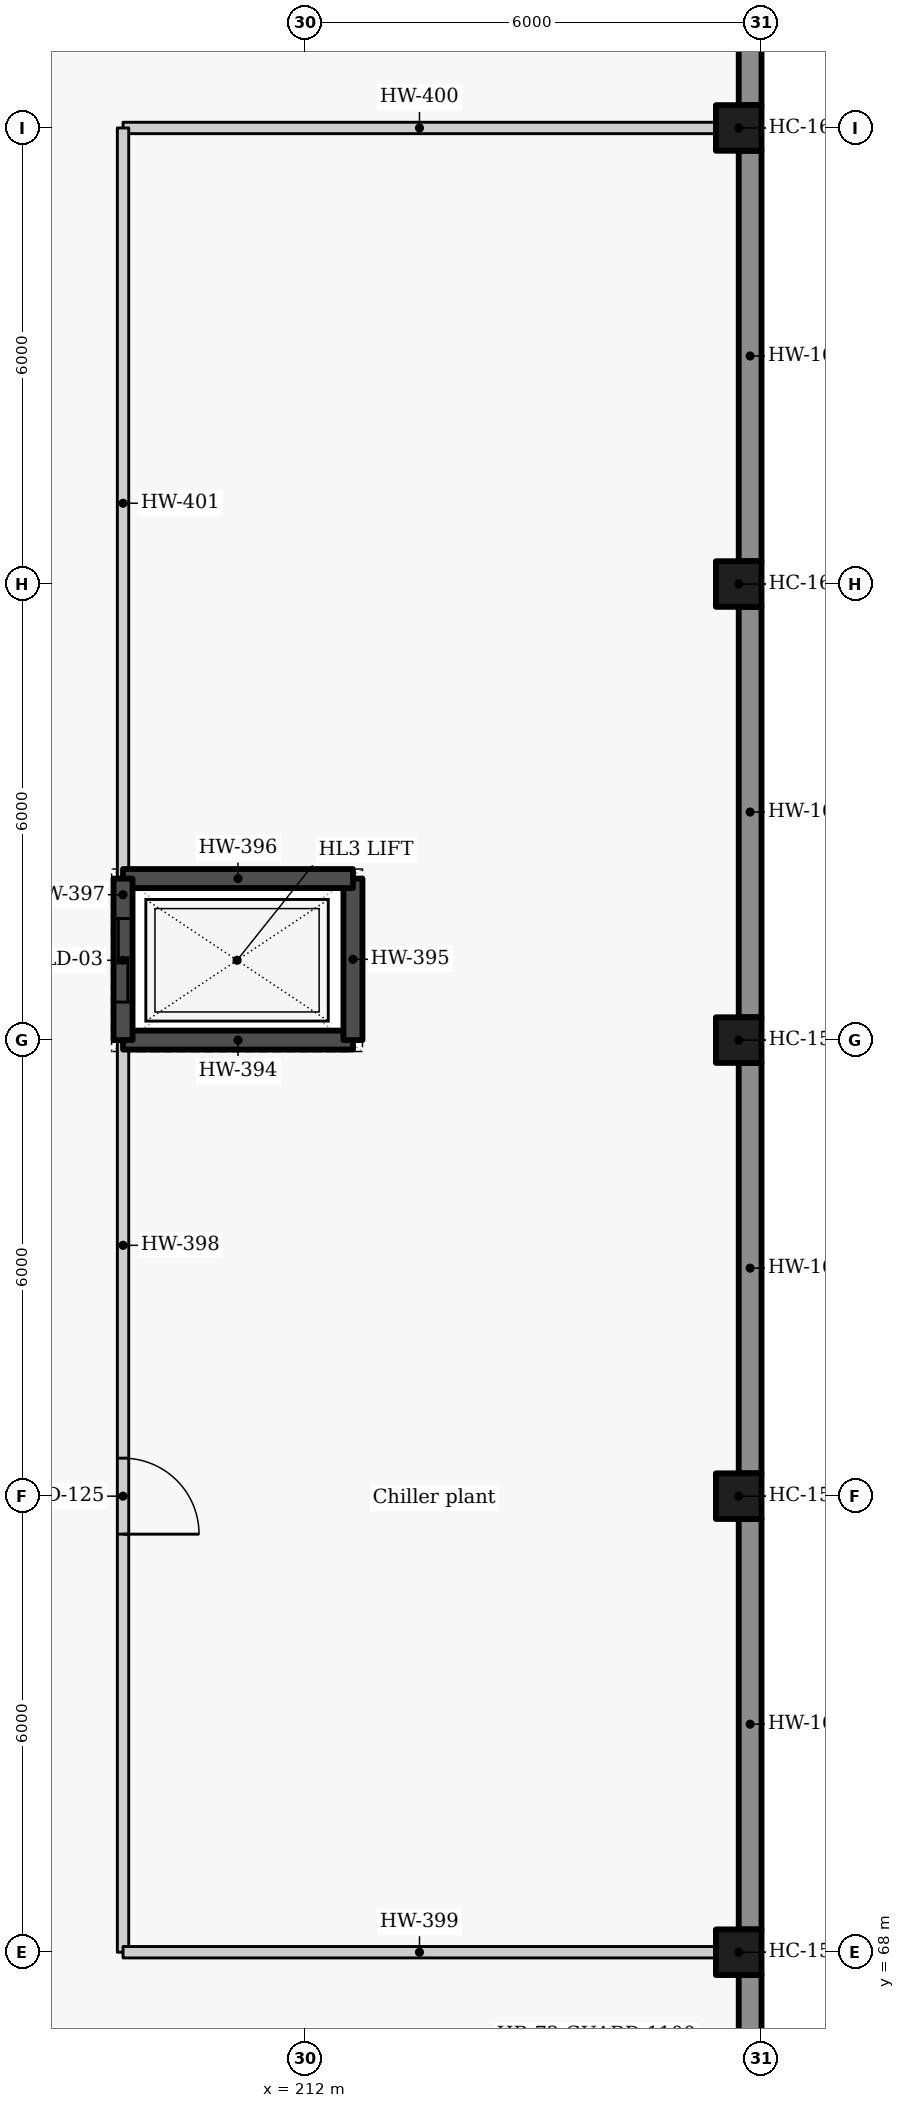
"""IFC4 building model, lengths in metres.
Left out: names, types, materials, properties, quantities, classifications, styles, units other than length and angle.
Written with IfcOpenShell. Run it as: python <this file> out.ifc"""

import sys

from ifc_helpers import new_model, si_unit, direction, frame, frame_2d, origin, origin_2d, place, context, subcontext, project, spatial, rectangle, extrude, element, fill, save


model = new_model("IFC4")
c1 = context("Model", 3, precision=1e-05, world=origin(), true_north=direction((0.0, 1.0)))
c2 = subcontext(c1, "Body", "Model", "MODEL_VIEW")
j1 = project(units=[si_unit("LENGTHUNIT", "METRE"), si_unit("PLANEANGLEUNIT", "RADIAN")], contexts=[c1])
p1 = place(None, origin())
s1 = spatial("IfcSite", under=j1, at=p1, CompositionType="ELEMENT")
p2 = place(p1, origin())
s2 = spatial("IfcBuilding", under=s1, at=p2, CompositionType="ELEMENT")
p3 = place(p2, frame((0.0, 0.0, 15.6)))
s3 = spatial("IfcBuildingStorey", under=s2, at=p3, CompositionType="ELEMENT", Elevation=15.6)
for number, where, z_axis, x_axis in (
    (1, (217.7, 68.0, 0.0), (0.0, 0.0, 1.0), (1.0, 0.0, 0.0)),
    (2, (217.7, 74.0, 0.0), (0.0, 0.0, 1.0), (1.0, 0.0, 0.0)),
    (3, (217.7, 80.0, 0.0), (0.0, 0.0, 1.0), (1.0, 0.0, 0.0)),
    (4, (217.7, 86.0, 0.0), (0.0, 0.0, 1.0), (1.0, 0.0, 0.0)),
    (5, (217.7, 92.0, 0.0), (0.0, 0.0, 1.0), (1.0, 0.0, 0.0)),
):
    element("IfcColumn", number, at=place(p3, frame(where, z_axis=z_axis, x_axis=x_axis)), inside=s3, PredefinedType="COLUMN", context=c2, shape_type="SweptSolid", body=[
        extrude(rectangle(XDim=0.6, YDim=0.6, at=origin_2d()), origin(), (0.0, 0.0, 1.0), 4.2),
    ])
p4 = place(p3, frame((217.85, 101.0, 0.0), z_axis=(0.0, 0.0, 1.0), x_axis=(0.0, -1.0, 0.0)))
e6 = element("IfcWall", 6, at=p4, inside=s3, PredefinedType="SOLIDWALL", context=c2, shape_type="SweptSolid", body=[
    extrude(rectangle(XDim=8.7, YDim=0.3, at=frame_2d((4.35, 0.0))), origin(), (0.0, 0.0, 1.0), 4.2),
])
for number, where, z_axis, x_axis in (
    (7, (217.85, 91.7, 0.0), (0.0, 0.0, 1.0), (0.0, -1.0, 0.0)),
    (8, (217.85, 85.7, 0.0), (0.0, 0.0, 1.0), (0.0, -1.0, 0.0)),
    (9, (217.85, 79.7, 0.0), (0.0, 0.0, 1.0), (0.0, -1.0, 0.0)),
    (10, (217.85, 73.7, 0.0), (0.0, 0.0, 1.0), (0.0, -1.0, 0.0)),
):
    element("IfcWall", number, at=place(p3, frame(where, z_axis=z_axis, x_axis=x_axis)), inside=s3, PredefinedType="SOLIDWALL", context=c2, shape_type="SweptSolid", body=[
        extrude(rectangle(XDim=5.4, YDim=0.3, at=frame_2d((2.7, 0.0))), origin(), (0.0, 0.0, 1.0), 4.2),
    ])
p5 = place(p3, frame((217.85, 67.7, 0.0), z_axis=(0.0, 0.0, 1.0), x_axis=(0.0, -1.0, 0.0)))
e11 = element("IfcWall", 11, at=p5, inside=s3, PredefinedType="SOLIDWALL", context=c2, shape_type="SweptSolid", body=[
    extrude(rectangle(XDim=8.7, YDim=0.3, at=frame_2d((4.35, 0.0))), origin(), (0.0, 0.0, 1.0), 4.2),
])
p6 = place(p3, frame((209.6, 80.0, 0.0), z_axis=(0.0, 0.0, 1.0), x_axis=(1.0, 0.0, 0.0)))
e12 = element("IfcWall", 12, at=p6, inside=s3, PredefinedType="SOLIDWALL", context=c2, shape_type="SweptSolid", body=[
    extrude(rectangle(XDim=3.025, YDim=0.25, at=frame_2d((1.512, 0.0))), origin(), (0.0, 0.0, 1.0), 4.2),
])
p7 = place(p3, frame((212.625, 80.0, 0.0), z_axis=(0.0, 0.0, 1.0), x_axis=(0.0, 1.0, 0.0)))
e13 = element("IfcWall", 13, at=p7, inside=s3, PredefinedType="SOLIDWALL", context=c2, shape_type="SweptSolid", body=[
    extrude(rectangle(XDim=2.125, YDim=0.25, at=frame_2d((1.062, 0.0))), origin(), (0.0, 0.0, 1.0), 4.2),
])
p8 = place(p3, frame((212.625, 82.125, 0.0), z_axis=(0.0, 0.0, 1.0), x_axis=(-1.0, 0.0, 0.0)))
e14 = element("IfcWall", 14, at=p8, inside=s3, PredefinedType="SOLIDWALL", context=c2, shape_type="SweptSolid", body=[
    extrude(rectangle(XDim=3.025, YDim=0.25, at=frame_2d((1.512, 0.0))), origin(), (0.0, 0.0, 1.0), 4.2),
])
p9 = place(p3, frame((209.6, 82.125, 0.0), z_axis=(0.0, 0.0, 1.0), x_axis=(0.0, -1.0, 0.0)))
e15 = element("IfcWall", 15, at=p9, inside=s3, PredefinedType="SOLIDWALL", context=c2, shape_type="SweptSolid", body=[
    extrude(rectangle(XDim=2.125, YDim=0.25, at=frame_2d((1.062, 0.0))), origin(), (0.0, 0.0, 1.0), 4.2),
])
p10 = place(p9, frame((0.525, 0.0, 0.0)))
e16 = element("IfcOpeningElement", 16, at=p10, cuts=e15, PredefinedType="OPENING", context=c2, shape_type="SweptSolid", body=[
    extrude(rectangle(XDim=1.1, YDim=2.1, at=frame_2d((0.55, 1.05))), frame((0.0, 0.135, 0.0), z_axis=(0.0, -1.0, 0.0), x_axis=(1.0, 0.0, 0.0)), (0.0, 0.0, 1.0), 0.27),
])
p11 = place(p3, frame((209.6, 80.0, 0.0), z_axis=(0.0, 0.0, 1.0), x_axis=(0.0, -1.0, 0.0)))
e17 = element("IfcWall", 17, at=p11, inside=s3, PredefinedType="PARTITIONING", context=c2, shape_type="SweptSolid", body=[
    extrude(rectangle(XDim=12.0, YDim=0.15, at=frame_2d((6.0, 0.0))), origin(), (0.0, 0.0, 1.0), 3.85),
])
p12 = place(p11, frame((5.5, 0.0, 0.0)))
e18 = element("IfcOpeningElement", 18, at=p12, cuts=e17, PredefinedType="OPENING", context=c2, shape_type="SweptSolid", body=[
    extrude(rectangle(XDim=1.0, YDim=2.1, at=frame_2d((0.5, 1.05))), frame((0.0, 0.085, 0.0), z_axis=(0.0, -1.0, 0.0), x_axis=(1.0, 0.0, 0.0)), (0.0, 0.0, 1.0), 0.17),
])
for number, where, z_axis, x_axis in (
    (19, (209.6, 68.0, 0.0), (0.0, 0.0, 1.0), (1.0, 0.0, 0.0)),
    (20, (217.4, 92.0, 0.0), (0.0, 0.0, 1.0), (-1.0, 0.0, 0.0)),
):
    element("IfcWall", number, at=place(p3, frame(where, z_axis=z_axis, x_axis=x_axis)), inside=s3, PredefinedType="PARTITIONING", context=c2, shape_type="SweptSolid", body=[
        extrude(rectangle(XDim=7.8, YDim=0.15, at=frame_2d((3.9, 0.0))), origin(), (0.0, 0.0, 1.0), 3.85),
    ])
p13 = place(p3, frame((209.6, 92.0, 0.0), z_axis=(0.0, 0.0, 1.0), x_axis=(0.0, -1.0, 0.0)))
e21 = element("IfcWall", 21, at=p13, inside=s3, PredefinedType="PARTITIONING", context=c2, shape_type="SweptSolid", body=[
    extrude(rectangle(XDim=9.875, YDim=0.15, at=frame_2d((4.938, 0.0))), origin(), (0.0, 0.0, 1.0), 3.85),
])
p14 = place(p10, origin())
e22 = element("IfcDoor", 22, at=p14, inside=s3, OperationType="SLIDING_TO_LEFT", PredefinedType="DOOR", context=c2, shape_type="SweptSolid", body=[
    extrude(rectangle(XDim=1.1, YDim=2.1, at=frame_2d((0.55, 1.05))), frame((0.0, 0.025, 0.0), z_axis=(0.0, -1.0, 0.0), x_axis=(1.0, 0.0, 0.0)), (0.0, 0.0, 1.0), 0.05),
])
fill(e16, e22)
p15 = place(p12, origin())
e23 = element("IfcDoor", 23, at=p15, inside=s3, OperationType="SINGLE_SWING_RIGHT", PredefinedType="DOOR", context=c2, shape_type="SweptSolid", body=[
    extrude(rectangle(XDim=1.0, YDim=2.1, at=frame_2d((0.5, 1.05))), frame((0.0, 0.025, 0.0), z_axis=(0.0, -1.0, 0.0), x_axis=(1.0, 0.0, 0.0)), (0.0, 0.0, 1.0), 0.05),
])
fill(e18, e23)
save(model, sys.argv[1])
